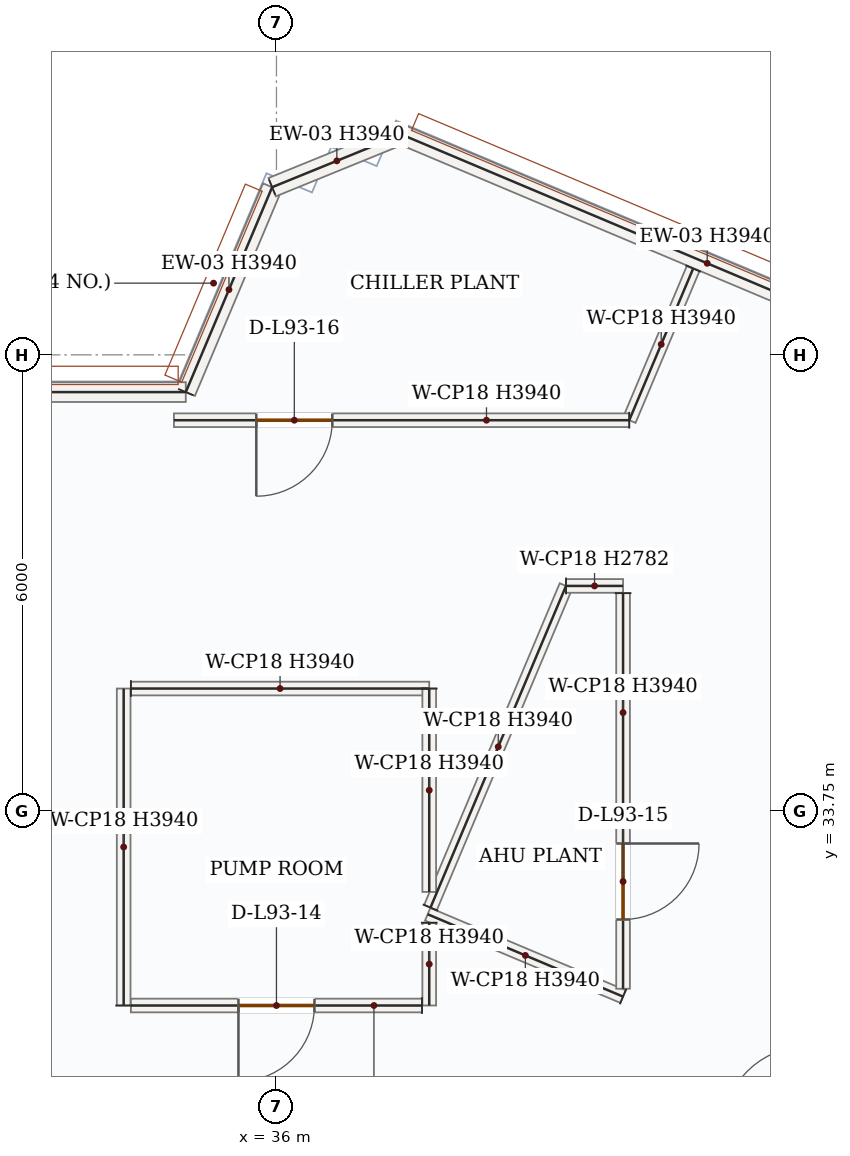
"""IFC4 building model, lengths in metres.
Left out: names, types, materials, properties, quantities, classifications, styles, units other than length and angle.
Written with IfcOpenShell. Run it as: python <this file> out.ifc"""

import sys

from ifc_helpers import new_model, si_unit, direction, frame, frame_2d, origin, place, context, subcontext, project, spatial, rectangle, extrude, source, transform, mapped, element, fill, save


model = new_model("IFC4")
c1 = context("Model", 3, precision=1e-05, world=origin(), true_north=direction((0.0, 1.0)))
c2 = subcontext(c1, "Body", "Model", "MODEL_VIEW")
j1 = project(units=[si_unit("LENGTHUNIT", "METRE"), si_unit("PLANEANGLEUNIT", "RADIAN")], contexts=[c1])
p1 = place(None, origin())
s1 = spatial("IfcSite", under=j1, at=p1, CompositionType="ELEMENT")
p2 = place(p1, origin())
s2 = spatial("IfcBuilding", under=s1, at=p2, CompositionType="ELEMENT")
p3 = place(p2, frame((0.0, 0.0, 383.85)))
s3 = spatial("IfcBuildingStorey", under=s2, at=p3, CompositionType="ELEMENT", Elevation=383.85)
m1 = source(origin(), c2, "Body", "SweptSolid", [
    extrude(rectangle(XDim=2.925, YDim=0.26, at=frame_2d((1.463, 0.0))), origin(), (0.0, 0.0, 1.0), 3.94),
])
p4 = place(p3, frame((34.807, 39.26, 0.0), z_axis=(0.0, 0.0, 1.0), x_axis=(0.388321883953, 0.921523800259, 0.0)))
e1 = element("IfcWall", 1, at=p4, inside=s3, PredefinedType="SOLIDWALL", context=c2, shape_type="MappedRepresentation", body=[
    mapped(m1, transform((0.0, 0.0, 0.0), x_axis=(1.0, 0.0, 0.0), y_axis=(0.0, 1.0, 0.0), z_axis=(0.0, 0.0, 1.0), scale=1.0)),
])
m2 = source(origin(), c2, "Body", "SweptSolid", [
    extrude(rectangle(XDim=1.839, YDim=0.26, at=frame_2d((0.919, 0.0))), origin(), (0.0, 0.0, 1.0), 3.94),
])
p5 = place(p3, frame((35.943, 41.956, 0.0), z_axis=(0.0, 0.0, 1.0), x_axis=(0.926216039781, 0.376993166586, 0.0)))
e2 = element("IfcWall", 2, at=p5, inside=s3, PredefinedType="SOLIDWALL", context=c2, shape_type="MappedRepresentation", body=[
    mapped(m2, transform((0.0, 0.0, 0.0), x_axis=(1.0, 0.0, 0.0), y_axis=(0.0, 1.0, 0.0), z_axis=(0.0, 0.0, 1.0), scale=1.0)),
])
m3 = source(origin(), c2, "Body", "SweptSolid", [
    extrude(rectangle(XDim=8.727, YDim=0.26, at=frame_2d((4.364, 0.0))), origin(), (0.0, 0.0, 1.0), 3.94),
])
p6 = place(p3, frame((37.646, 42.649, 0.0), z_axis=(0.0, 0.0, 1.0), x_axis=(0.921524227272, -0.38832087061, 0.0)))
e3 = element("IfcWall", 3, at=p6, inside=s3, PredefinedType="SOLIDWALL", context=c2, shape_type="MappedRepresentation", body=[
    mapped(m3, transform((0.0, 0.0, 0.0), x_axis=(1.0, 0.0, 0.0), y_axis=(0.0, 1.0, 0.0), z_axis=(0.0, 0.0, 1.0), scale=1.0)),
])
m4 = source(origin(), c2, "Body", "SweptSolid", [
    extrude(rectangle(XDim=12.149, YDim=0.26, at=frame_2d((6.075, 0.0))), origin(), (0.0, 0.0, 1.0), 3.94),
])
p7 = place(p3, frame((22.658, 39.26, 0.0), z_axis=(0.0, 0.0, 1.0), x_axis=(1.0, 0.0, 0.0)))
e4 = element("IfcWall", 4, at=p7, inside=s3, PredefinedType="SOLIDWALL", context=c2, shape_type="MappedRepresentation", body=[
    mapped(m4, transform((0.0, 0.0, 0.0), x_axis=(1.0, 0.0, 0.0), y_axis=(0.0, 1.0, 0.0), z_axis=(0.0, 0.0, 1.0), scale=1.0)),
])
m5 = source(origin(), c2, "Body", "SweptSolid", [
    extrude(rectangle(XDim=2.789, YDim=0.18, at=frame_2d((1.395, 0.0))), origin(), (0.0, 0.0, 1.0), 3.94),
])
p8 = place(p3, frame((40.56, 31.307, 0.0), z_axis=(0.0, 0.0, 1.0), x_axis=(-0.921549681246, 0.388260460253, 0.0)))
e5 = element("IfcWall", 5, at=p8, inside=s3, PredefinedType="PARTITIONING", context=c2, shape_type="MappedRepresentation", body=[
    mapped(m5, transform((0.0, 0.0, 0.0), x_axis=(1.0, 0.0, 0.0), y_axis=(0.0, 1.0, 0.0), z_axis=(0.0, 0.0, 1.0), scale=1.0)),
])
m6 = source(origin(), c2, "Body", "SweptSolid", [
    extrude(rectangle(XDim=4.592, YDim=0.18, at=frame_2d((2.296, 0.0))), origin(), (0.0, 0.0, 1.0), 3.94),
])
p9 = place(p3, frame((38.026, 32.478, 0.0), z_axis=(0.0, 0.0, 1.0), x_axis=(0.388304163806, 0.92153126717, 0.0)))
e6 = element("IfcWall", 6, at=p9, inside=s3, PredefinedType="PARTITIONING", context=c2, shape_type="MappedRepresentation", body=[
    mapped(m6, transform((0.0, 0.0, 0.0), x_axis=(1.0, 0.0, 0.0), y_axis=(0.0, 1.0, 0.0), z_axis=(0.0, 0.0, 1.0), scale=1.0)),
])
m7 = source(origin(), c2, "Body", "SweptSolid", [
    extrude(rectangle(XDim=0.75, YDim=0.18, at=frame_2d((0.375, 0.0))), origin(), (0.0, 0.0, 1.0), 2.782),
])
p10 = place(p3, frame((39.81, 36.71, 0.0), z_axis=(0.0, 0.0, 1.0), x_axis=(1.0, 0.0, 0.0)))
e7 = element("IfcWall", 7, at=p10, inside=s3, PredefinedType="PARTITIONING", context=c2, shape_type="MappedRepresentation", body=[
    mapped(m7, transform((0.0, 0.0, 0.0), x_axis=(1.0, 0.0, 0.0), y_axis=(0.0, 1.0, 0.0), z_axis=(0.0, 0.0, 1.0), scale=1.0)),
])
p11 = place(p3, frame((40.56, 36.615, 0.0), z_axis=(0.0, 0.0, 1.0), x_axis=(0.0, -1.0, 0.0)))
e8 = element("IfcWall", 8, at=p11, inside=s3, PredefinedType="PARTITIONING", context=c2, shape_type="SweptSolid", body=[
    extrude(rectangle(XDim=5.205, YDim=0.18, at=frame_2d((2.602, 0.0))), origin(), (0.0, 0.0, 1.0), 3.94),
])
p12 = place(p11, frame((3.294, 0.0, 0.0)))
e9 = element("IfcOpeningElement", 9, at=p12, cuts=e8, PredefinedType="OPENING", context=c2, shape_type="SweptSolid", body=[
    extrude(rectangle(XDim=1.0, YDim=2.15, at=frame_2d((0.5, 1.075))), frame((0.0, 0.1, 0.0), z_axis=(0.0, -1.0, 0.0), x_axis=(1.0, 0.0, 0.0)), (0.0, 0.0, 1.0), 0.2),
])
m8 = source(origin(), c2, "Body", "SweptSolid", [
    extrude(rectangle(XDim=4.17, YDim=0.18, at=frame_2d((2.085, 0.0))), origin(), (0.0, 0.0, 1.0), 3.94),
])
p13 = place(p3, frame((33.99, 31.19, 0.0), z_axis=(0.0, 0.0, 1.0), x_axis=(0.0, 1.0, 0.0)))
e10 = element("IfcWall", 10, at=p13, inside=s3, PredefinedType="PARTITIONING", context=c2, shape_type="MappedRepresentation", body=[
    mapped(m8, transform((0.0, 0.0, 0.0), x_axis=(1.0, 0.0, 0.0), y_axis=(0.0, 1.0, 0.0), z_axis=(0.0, 0.0, 1.0), scale=1.0)),
])
m9 = source(origin(), c2, "Body", "SweptSolid", [
    extrude(rectangle(XDim=3.925, YDim=0.18, at=frame_2d((1.962, 0.0))), origin(), (0.0, 0.0, 1.0), 3.94),
])
p14 = place(p3, frame((34.085, 35.36, 0.0), z_axis=(0.0, 0.0, 1.0), x_axis=(1.0, 0.0, 0.0)))
e11 = element("IfcWall", 11, at=p14, inside=s3, PredefinedType="PARTITIONING", context=c2, shape_type="MappedRepresentation", body=[
    mapped(m9, transform((0.0, 0.0, 0.0), x_axis=(1.0, 0.0, 0.0), y_axis=(0.0, 1.0, 0.0), z_axis=(0.0, 0.0, 1.0), scale=1.0)),
])
m10 = source(origin(), c2, "Body", "SweptSolid", [
    extrude(rectangle(XDim=2.676, YDim=0.18, at=frame_2d((1.338, 0.0))), origin(), (0.0, 0.0, 1.0), 3.94),
])
p15 = place(p3, frame((38.01, 35.36, 0.0), z_axis=(0.0, 0.0, 1.0), x_axis=(0.0, -1.0, 0.0)))
e12 = element("IfcWall", 12, at=p15, inside=s3, PredefinedType="PARTITIONING", context=c2, shape_type="MappedRepresentation", body=[
    mapped(m10, transform((0.0, 0.0, 0.0), x_axis=(1.0, 0.0, 0.0), y_axis=(0.0, 1.0, 0.0), z_axis=(0.0, 0.0, 1.0), scale=1.0)),
])
m11 = source(origin(), c2, "Body", "SweptSolid", [
    extrude(rectangle(XDim=1.089, YDim=0.18, at=frame_2d((0.544, 0.0))), origin(), (0.0, 0.0, 1.0), 3.94),
])
p16 = place(p3, frame((38.01, 32.279, 0.0), z_axis=(0.0, 0.0, 1.0), x_axis=(0.0, -1.0, 0.0)))
e13 = element("IfcWall", 13, at=p16, inside=s3, PredefinedType="PARTITIONING", context=c2, shape_type="MappedRepresentation", body=[
    mapped(m11, transform((0.0, 0.0, 0.0), x_axis=(1.0, 0.0, 0.0), y_axis=(0.0, 1.0, 0.0), z_axis=(0.0, 0.0, 1.0), scale=1.0)),
])
p17 = place(p3, frame((37.915, 31.19, 0.0), z_axis=(0.0, 0.0, 1.0), x_axis=(-1.0, 0.0, 0.0)))
e14 = element("IfcWall", 14, at=p17, inside=s3, PredefinedType="PARTITIONING", context=c2, shape_type="SweptSolid", body=[
    extrude(rectangle(XDim=3.83, YDim=0.18, at=frame_2d((1.915, 0.0))), origin(), (0.0, 0.0, 1.0), 3.94),
])
p18 = place(p17, frame((1.415, 0.0, 0.0)))
e15 = element("IfcOpeningElement", 15, at=p18, cuts=e14, PredefinedType="OPENING", context=c2, shape_type="SweptSolid", body=[
    extrude(rectangle(XDim=1.0, YDim=2.15, at=frame_2d((0.5, 1.075))), frame((0.0, 0.1, 0.0), z_axis=(0.0, -1.0, 0.0), x_axis=(1.0, 0.0, 0.0)), (0.0, 0.0, 1.0), 0.2),
])
m12 = source(origin(), c2, "Body", "SweptSolid", [
    extrude(rectangle(XDim=2.166, YDim=0.18, at=frame_2d((1.083, 0.0))), origin(), (0.0, 0.0, 1.0), 3.94),
])
p19 = place(p3, frame((41.482, 40.886, 0.0), z_axis=(0.0, 0.0, 1.0), x_axis=(-0.388334150913, -0.921518630976, 0.0)))
e16 = element("IfcWall", 16, at=p19, inside=s3, PredefinedType="PARTITIONING", context=c2, shape_type="MappedRepresentation", body=[
    mapped(m12, transform((0.0, 0.0, 0.0), x_axis=(1.0, 0.0, 0.0), y_axis=(0.0, 1.0, 0.0), z_axis=(0.0, 0.0, 1.0), scale=1.0)),
])
p20 = place(p3, frame((40.641, 38.89, 0.0), z_axis=(0.0, 0.0, 1.0), x_axis=(-1.0, 0.0, 0.0)))
e17 = element("IfcWall", 17, at=p20, inside=s3, PredefinedType="PARTITIONING", context=c2, shape_type="SweptSolid", body=[
    extrude(rectangle(XDim=5.99, YDim=0.18, at=frame_2d((2.995, 0.0))), origin(), (0.0, 0.0, 1.0), 3.94),
])
p21 = place(p20, frame((3.906, 0.0, 0.0)))
e18 = element("IfcOpeningElement", 18, at=p21, cuts=e17, PredefinedType="OPENING", context=c2, shape_type="SweptSolid", body=[
    extrude(rectangle(XDim=1.0, YDim=2.15, at=frame_2d((0.5, 1.075))), frame((0.0, 0.1, 0.0), z_axis=(0.0, -1.0, 0.0), x_axis=(1.0, 0.0, 0.0)), (0.0, 0.0, 1.0), 0.2),
])
m13 = source(origin(), c2, "Body", "SweptSolid", [
    extrude(rectangle(XDim=1.0, YDim=2.15, at=frame_2d((0.5, 1.075))), frame((0.0, 0.025, 0.0), z_axis=(0.0, -1.0, 0.0), x_axis=(1.0, 0.0, 0.0)), (0.0, 0.0, 1.0), 0.05),
])
p22 = place(p18, origin())
e19 = element("IfcDoor", 19, at=p22, inside=s3, OperationType="SINGLE_SWING_RIGHT", PredefinedType="DOOR", context=c2, shape_type="MappedRepresentation", body=[
    mapped(m13, transform((0.0, 0.0, 0.0), x_axis=(1.0, 0.0, 0.0), y_axis=(0.0, 1.0, 0.0), z_axis=(0.0, 0.0, 1.0), scale=1.0)),
])
fill(e15, e19)
p23 = place(p12, origin())
e20 = element("IfcDoor", 20, at=p23, inside=s3, OperationType="SINGLE_SWING_LEFT", PredefinedType="DOOR", context=c2, shape_type="MappedRepresentation", body=[
    mapped(m13, transform((0.0, 0.0, 0.0), x_axis=(1.0, 0.0, 0.0), y_axis=(0.0, 1.0, 0.0), z_axis=(0.0, 0.0, 1.0), scale=1.0)),
])
fill(e9, e20)
p24 = place(p21, origin())
e21 = element("IfcDoor", 21, at=p24, inside=s3, OperationType="SINGLE_SWING_RIGHT", PredefinedType="DOOR", context=c2, shape_type="MappedRepresentation", body=[
    mapped(m13, transform((0.0, 0.0, 0.0), x_axis=(1.0, 0.0, 0.0), y_axis=(0.0, 1.0, 0.0), z_axis=(0.0, 0.0, 1.0), scale=1.0)),
])
fill(e18, e21)
save(model, sys.argv[1])
